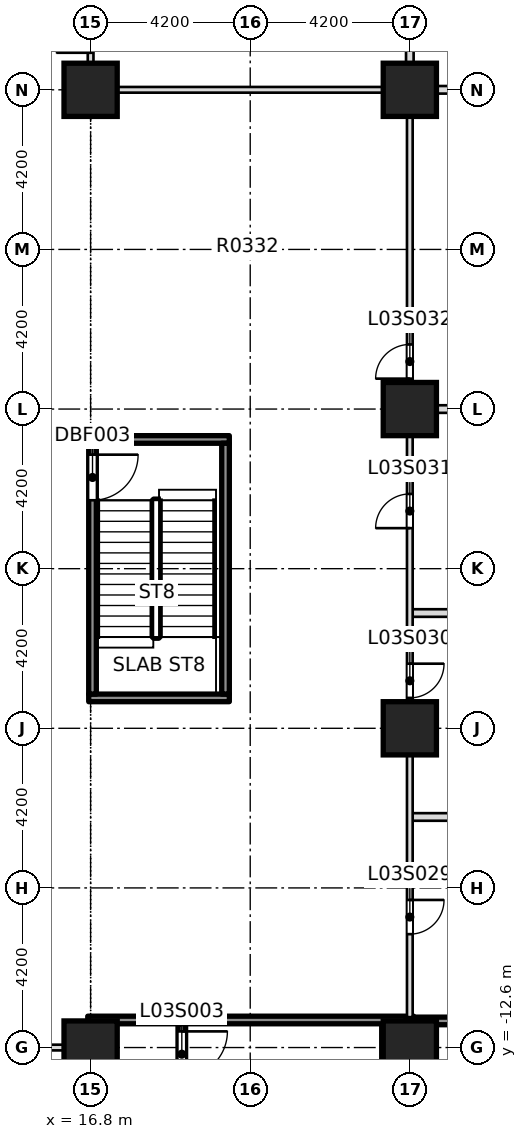
"""IFC4 building model, lengths in metres.
Left out: names, types, materials, properties, quantities, classifications, styles, units other than length and angle.
Written with IfcOpenShell. Run it as: python <this file> out.ifc"""

import sys

from ifc_helpers import new_model, si_unit, direction, frame, frame_2d, origin, origin_2d, place, context, subcontext, project, spatial, rectangle, extrude, element, fill, save


model = new_model("IFC4")
c1 = context("Model", 3, precision=1e-05, world=origin(), true_north=direction((0.0, 1.0)))
c2 = subcontext(c1, "Body", "Model", "MODEL_VIEW")
j1 = project(units=[si_unit("LENGTHUNIT", "METRE"), si_unit("PLANEANGLEUNIT", "RADIAN")], contexts=[c1])
p1 = place(None, origin())
s1 = spatial("IfcSite", under=j1, at=p1, CompositionType="ELEMENT")
p2 = place(p1, origin())
s2 = spatial("IfcBuilding", under=s1, at=p2, CompositionType="ELEMENT")
p3 = place(p2, frame((0.0, 0.0, 20.0)))
s3 = spatial("IfcBuildingStorey", under=s2, at=p3, CompositionType="ELEMENT", Elevation=20.0)
for number, where, z_axis, x_axis in (
    (1, (16.8, -12.6, -0.4), (0.0, 0.0, 1.0), (1.0, 0.0, 0.0)),
    (2, (25.2, -12.6, -0.4), (0.0, 0.0, 1.0), (1.0, 0.0, 0.0)),
    (3, (25.2, -4.2, -0.4), (0.0, 0.0, 1.0), (1.0, 0.0, 0.0)),
    (4, (25.2, 4.2, -0.4), (0.0, 0.0, 1.0), (1.0, 0.0, 0.0)),
    (5, (16.8, 12.6, -0.4), (0.0, 0.0, 1.0), (1.0, 0.0, 0.0)),
    (6, (25.2, 12.6, -0.4), (0.0, 0.0, 1.0), (1.0, 0.0, 0.0)),
):
    element("IfcColumn", number, at=place(p3, frame(where, z_axis=z_axis, x_axis=x_axis)), inside=s3, PredefinedType="COLUMN", context=c2, shape_type="SweptSolid", body=[
        extrude(rectangle(XDim=1.4, YDim=1.4, at=origin_2d()), origin(), (0.0, 0.0, 1.0), 5.0),
    ])
p4 = place(p3, frame((7.275, -12.6, 0.0), z_axis=(0.0, 0.0, 1.0), x_axis=(1.0, 0.0, 0.0)))
e7 = element("IfcWall", 7, at=p4, inside=s3, PredefinedType="PARTITIONING", context=c2, shape_type="SweptSolid", body=[
    extrude(rectangle(XDim=9.625, YDim=0.15, at=frame_2d((4.812, 0.0))), origin(), (0.0, 0.0, 1.0), 4.6),
])
p5 = place(p3, frame((16.725, -11.875, 0.0), z_axis=(0.0, 0.0, 1.0), x_axis=(1.0, 0.0, 0.0)))
e8 = element("IfcWall", 8, at=p5, inside=s3, PredefinedType="SOLIDWALL", context=c2, shape_type="SweptSolid", body=[
    extrude(rectangle(XDim=8.575, YDim=0.2, at=frame_2d((4.288, 0.0))), origin(), (0.0, 0.0, 1.0), 4.6),
])
p6 = place(p3, frame((25.275, -6.533, 0.0), z_axis=(0.0, 0.0, 1.0), x_axis=(1.0, 0.0, 0.0)))
e9 = element("IfcWall", 9, at=p6, inside=s3, PredefinedType="PARTITIONING", context=c2, shape_type="SweptSolid", body=[
    extrude(rectangle(XDim=25.675, YDim=0.2, at=frame_2d((12.837, 0.0))), origin(), (0.0, 0.0, 1.0), 4.6),
])
p7 = place(p3, frame((25.275, -1.167, 0.0), z_axis=(0.0, 0.0, 1.0), x_axis=(1.0, 0.0, 0.0)))
e10 = element("IfcWall", 10, at=p7, inside=s3, PredefinedType="PARTITIONING", context=c2, shape_type="SweptSolid", body=[
    extrude(rectangle(XDim=16.925, YDim=0.2, at=frame_2d((8.462, 0.0))), origin(), (0.0, 0.0, 1.0), 4.6),
])
p8 = place(p3, frame((25.275, 4.2, 0.0), z_axis=(0.0, 0.0, 1.0), x_axis=(1.0, 0.0, 0.0)))
e11 = element("IfcWall", 11, at=p8, inside=s3, PredefinedType="PARTITIONING", context=c2, shape_type="SweptSolid", body=[
    extrude(rectangle(XDim=25.675, YDim=0.2, at=frame_2d((12.837, 0.0))), origin(), (0.0, 0.0, 1.0), 4.6),
])
p9 = place(p3, frame((16.725, 12.6, 0.0), z_axis=(0.0, 0.0, 1.0), x_axis=(1.0, 0.0, 0.0)))
e12 = element("IfcWall", 12, at=p9, inside=s3, PredefinedType="PARTITIONING", context=c2, shape_type="SweptSolid", body=[
    extrude(rectangle(XDim=8.575, YDim=0.15, at=frame_2d((4.288, 0.0))), origin(), (0.0, 0.0, 1.0), 4.6),
])
p10 = place(p3, frame((25.1, 12.6, 0.0), z_axis=(0.0, 0.0, 1.0), x_axis=(1.0, 0.0, 0.0)))
e13 = element("IfcWall", 13, at=p10, inside=s3, PredefinedType="PARTITIONING", context=c2, shape_type="SweptSolid", body=[
    extrude(rectangle(XDim=25.85, YDim=0.2, at=frame_2d((12.925, 0.0))), origin(), (0.0, 0.0, 1.0), 4.6),
])
p11 = place(p3, frame((16.8, -18.125, 0.0), z_axis=(0.0, 0.0, 1.0), x_axis=(0.0, 1.0, 0.0)))
e14 = element("IfcWall", 14, at=p11, inside=s3, PredefinedType="PARTITIONING", context=c2, shape_type="SweptSolid", body=[
    extrude(rectangle(XDim=5.45, YDim=0.2, at=frame_2d((2.725, 0.0))), origin(), (0.0, 0.0, 1.0), 4.6),
])
p12 = place(p3, frame((16.8, -12.525, 0.0), z_axis=(0.0, 0.0, 1.0), x_axis=(0.0, 1.0, 0.0)))
e15 = element("IfcWall", 15, at=p12, inside=s3, PredefinedType="PARTITIONING", context=c2, shape_type="SweptSolid", body=[
    extrude(rectangle(XDim=0.55, YDim=0.15, at=frame_2d((0.275, 0.0))), origin(), (0.0, 0.0, 1.0), 4.6),
])
p13 = place(p3, frame((16.8, 12.675, 0.0), z_axis=(0.0, 0.0, 1.0), x_axis=(0.0, 1.0, 0.0)))
e16 = element("IfcWall", 16, at=p13, inside=s3, PredefinedType="PARTITIONING", context=c2, shape_type="SweptSolid", body=[
    extrude(rectangle(XDim=2.7, YDim=0.15, at=frame_2d((1.35, 0.0))), origin(), (0.0, 0.0, 1.0), 4.6),
])
p14 = place(p13, frame((0.9, 0.0, 0.0)))
e17 = element("IfcOpeningElement", 17, at=p14, cuts=e16, PredefinedType="OPENING", context=c2, shape_type="SweptSolid", body=[
    extrude(rectangle(XDim=0.9, YDim=2.1, at=frame_2d((0.45, 1.05))), frame((0.0, 0.085, 0.0), z_axis=(0.0, -1.0, 0.0), x_axis=(1.0, 0.0, 0.0)), (0.0, 0.0, 1.0), 0.17),
])
p15 = place(p3, frame((19.2, -18.125, 0.0), z_axis=(0.0, 0.0, 1.0), x_axis=(0.0, 1.0, 0.0)))
e18 = element("IfcWall", 18, at=p15, inside=s3, PredefinedType="SOLIDWALL", context=c2, shape_type="SweptSolid", body=[
    extrude(rectangle(XDim=6.15, YDim=0.2, at=frame_2d((3.075, 0.0))), origin(), (0.0, 0.0, 1.0), 4.6),
])
p16 = place(p15, frame((4.75, 0.0, 0.0)))
e19 = element("IfcOpeningElement", 19, at=p16, cuts=e18, PredefinedType="OPENING", context=c2, shape_type="SweptSolid", body=[
    extrude(rectangle(XDim=1.2, YDim=2.1, at=frame_2d((0.6, 1.05))), frame((0.0, 0.11, 0.0), z_axis=(0.0, -1.0, 0.0), x_axis=(1.0, 0.0, 0.0)), (0.0, 0.0, 1.0), 0.22),
])
p17 = place(p3, frame((25.2, -18.125, 0.0), z_axis=(0.0, 0.0, 1.0), x_axis=(0.0, 1.0, 0.0)))
e20 = element("IfcWall", 20, at=p17, inside=s3, PredefinedType="SOLIDWALL", context=c2, shape_type="SweptSolid", body=[
    extrude(rectangle(XDim=6.125, YDim=0.2, at=frame_2d((3.062, 0.0))), origin(), (0.0, 0.0, 1.0), 4.6),
])
p18 = place(p3, frame((25.2, -11.8, 0.0), z_axis=(0.0, 0.0, 1.0), x_axis=(0.0, 1.0, 0.0)))
e21 = element("IfcWall", 21, at=p18, inside=s3, PredefinedType="PARTITIONING", context=c2, shape_type="SweptSolid", body=[
    extrude(rectangle(XDim=24.3, YDim=0.15, at=frame_2d((12.15, 0.0))), origin(), (0.0, 0.0, 1.0), 4.6),
])
p19 = place(p18, frame((2.184, 0.0, 0.0)))
e22 = element("IfcOpeningElement", 22, at=p19, cuts=e21, PredefinedType="OPENING", context=c2, shape_type="SweptSolid", body=[
    extrude(rectangle(XDim=0.9, YDim=2.1, at=frame_2d((0.45, 1.05))), frame((0.0, 0.085, 0.0), z_axis=(0.0, -1.0, 0.0), x_axis=(1.0, 0.0, 0.0)), (0.0, 0.0, 1.0), 0.17),
])
p20 = place(p18, frame((8.4, 0.0, 0.0)))
e23 = element("IfcOpeningElement", 23, at=p20, cuts=e21, PredefinedType="OPENING", context=c2, shape_type="SweptSolid", body=[
    extrude(rectangle(XDim=0.9, YDim=2.1, at=frame_2d((0.45, 1.05))), frame((0.0, 0.085, 0.0), z_axis=(0.0, -1.0, 0.0), x_axis=(1.0, 0.0, 0.0)), (0.0, 0.0, 1.0), 0.17),
])
p21 = place(p18, frame((12.866, 0.0, 0.0)))
e24 = element("IfcOpeningElement", 24, at=p21, cuts=e21, PredefinedType="OPENING", context=c2, shape_type="SweptSolid", body=[
    extrude(rectangle(XDim=0.9, YDim=2.1, at=frame_2d((0.45, 1.05))), frame((0.0, 0.085, 0.0), z_axis=(0.0, -1.0, 0.0), x_axis=(1.0, 0.0, 0.0)), (0.0, 0.0, 1.0), 0.17),
])
p22 = place(p18, frame((16.8, 0.0, 0.0)))
e25 = element("IfcOpeningElement", 25, at=p22, cuts=e21, PredefinedType="OPENING", context=c2, shape_type="SweptSolid", body=[
    extrude(rectangle(XDim=0.9, YDim=2.1, at=frame_2d((0.45, 1.05))), frame((0.0, 0.085, 0.0), z_axis=(0.0, -1.0, 0.0), x_axis=(1.0, 0.0, 0.0)), (0.0, 0.0, 1.0), 0.17),
])
p23 = place(p3, frame((25.2, 12.7, 0.0), z_axis=(0.0, 0.0, 1.0), x_axis=(0.0, 1.0, 0.0)))
e26 = element("IfcWall", 26, at=p23, inside=s3, PredefinedType="PARTITIONING", context=c2, shape_type="SweptSolid", body=[
    extrude(rectangle(XDim=8.975, YDim=0.2, at=frame_2d((4.488, 0.0))), origin(), (0.0, 0.0, 1.0), 4.6),
])
for number, where, z_axis, x_axis in (
    (27, (16.75, -3.4, 0.0), (0.0, 0.0, 1.0), (1.0, 0.0, 0.0)),
    (28, (16.75, 3.4, 0.0), (0.0, 0.0, 1.0), (1.0, 0.0, 0.0)),
):
    element("IfcWall", number, at=place(p3, frame(where, z_axis=z_axis, x_axis=x_axis)), inside=s3, PredefinedType="SOLIDWALL", context=c2, shape_type="SweptSolid", body=[
        extrude(rectangle(XDim=3.7, YDim=0.2, at=frame_2d((1.85, 0.0))), origin(), (0.0, 0.0, 1.0), 4.6),
    ])
p24 = place(p3, frame((16.85, -3.3, 0.0), z_axis=(0.0, 0.0, 1.0), x_axis=(0.0, 1.0, 0.0)))
e29 = element("IfcWall", 29, at=p24, inside=s3, PredefinedType="SOLIDWALL", context=c2, shape_type="SweptSolid", body=[
    extrude(rectangle(XDim=6.6, YDim=0.2, at=frame_2d((3.3, 0.0))), origin(), (0.0, 0.0, 1.0), 4.6),
])
p25 = place(p24, frame((5.1, 0.0, 0.0)))
e30 = element("IfcOpeningElement", 30, at=p25, cuts=e29, PredefinedType="OPENING", context=c2, shape_type="SweptSolid", body=[
    extrude(rectangle(XDim=1.2, YDim=2.1, at=frame_2d((0.6, 1.05))), frame((0.0, 0.11, 0.0), z_axis=(0.0, -1.0, 0.0), x_axis=(1.0, 0.0, 0.0)), (0.0, 0.0, 1.0), 0.22),
])
p26 = place(p3, frame((20.35, -3.3, 0.0), z_axis=(0.0, 0.0, 1.0), x_axis=(0.0, 1.0, 0.0)))
e31 = element("IfcWall", 31, at=p26, inside=s3, PredefinedType="SOLIDWALL", context=c2, shape_type="SweptSolid", body=[
    extrude(rectangle(XDim=6.6, YDim=0.2, at=frame_2d((3.3, 0.0))), origin(), (0.0, 0.0, 1.0), 4.6),
])
p27 = place(p3, frame((25.1, -11.9, 0.0), z_axis=(0.0, 0.0, 1.0), x_axis=(1.0, 0.0, 0.0)))
e32 = element("IfcWall", 32, at=p27, inside=s3, PredefinedType="SOLIDWALL", context=c2, shape_type="SweptSolid", body=[
    extrude(rectangle(XDim=25.85, YDim=0.2, at=frame_2d((12.925, 0.0))), origin(), (0.0, 0.0, 1.0), 4.6),
])
p28 = place(p16, origin())
e33 = element("IfcDoor", 33, at=p28, inside=s3, OperationType="DOUBLE_DOOR_SINGLE_SWING", PredefinedType="DOOR", context=c2, shape_type="SweptSolid", body=[
    extrude(rectangle(XDim=1.2, YDim=2.1, at=frame_2d((0.6, 1.05))), frame((0.0, 0.025, 0.0), z_axis=(0.0, -1.0, 0.0), x_axis=(1.0, 0.0, 0.0)), (0.0, 0.0, 1.0), 0.05),
])
fill(e19, e33)
p29 = place(p19, origin())
e34 = element("IfcDoor", 34, at=p29, inside=s3, OperationType="SINGLE_SWING_LEFT", PredefinedType="DOOR", context=c2, shape_type="SweptSolid", body=[
    extrude(rectangle(XDim=0.9, YDim=2.1, at=frame_2d((0.45, 1.05))), frame((0.0, 0.025, 0.0), z_axis=(0.0, -1.0, 0.0), x_axis=(1.0, 0.0, 0.0)), (0.0, 0.0, 1.0), 0.05),
])
fill(e22, e34)
p30 = place(p20, origin())
e35 = element("IfcDoor", 35, at=p30, inside=s3, OperationType="SINGLE_SWING_LEFT", PredefinedType="DOOR", context=c2, shape_type="SweptSolid", body=[
    extrude(rectangle(XDim=0.9, YDim=2.1, at=frame_2d((0.45, 1.05))), frame((0.0, 0.025, 0.0), z_axis=(0.0, -1.0, 0.0), x_axis=(1.0, 0.0, 0.0)), (0.0, 0.0, 1.0), 0.05),
])
fill(e23, e35)
p31 = place(p21, origin())
e36 = element("IfcDoor", 36, at=p31, inside=s3, OperationType="SINGLE_SWING_RIGHT", PredefinedType="DOOR", context=c2, shape_type="SweptSolid", body=[
    extrude(rectangle(XDim=0.9, YDim=2.1, at=frame_2d((0.45, 1.05))), frame((0.0, 0.025, 0.0), z_axis=(0.0, -1.0, 0.0), x_axis=(1.0, 0.0, 0.0)), (0.0, 0.0, 1.0), 0.05),
])
fill(e24, e36)
p32 = place(p22, origin())
e37 = element("IfcDoor", 37, at=p32, inside=s3, OperationType="SINGLE_SWING_LEFT", PredefinedType="DOOR", context=c2, shape_type="SweptSolid", body=[
    extrude(rectangle(XDim=0.9, YDim=2.1, at=frame_2d((0.45, 1.05))), frame((0.0, 0.025, 0.0), z_axis=(0.0, -1.0, 0.0), x_axis=(1.0, 0.0, 0.0)), (0.0, 0.0, 1.0), 0.05),
])
fill(e25, e37)
p33 = place(p14, origin())
e38 = element("IfcDoor", 38, at=p33, inside=s3, OperationType="SINGLE_SWING_RIGHT", PredefinedType="DOOR", context=c2, shape_type="SweptSolid", body=[
    extrude(rectangle(XDim=0.9, YDim=2.1, at=frame_2d((0.45, 1.05))), frame((0.0, 0.025, 0.0), z_axis=(0.0, -1.0, 0.0), x_axis=(1.0, 0.0, 0.0)), (0.0, 0.0, 1.0), 0.05),
])
fill(e17, e38)
p34 = place(p25, origin())
e39 = element("IfcDoor", 39, at=p34, inside=s3, OperationType="SINGLE_SWING_LEFT", PredefinedType="DOOR", context=c2, shape_type="SweptSolid", body=[
    extrude(rectangle(XDim=1.2, YDim=2.1, at=frame_2d((0.6, 1.05))), frame((0.0, 0.025, 0.0), z_axis=(0.0, -1.0, 0.0), x_axis=(1.0, 0.0, 0.0)), (0.0, 0.0, 1.0), 0.05),
])
fill(e30, e39)
save(model, sys.argv[1])
